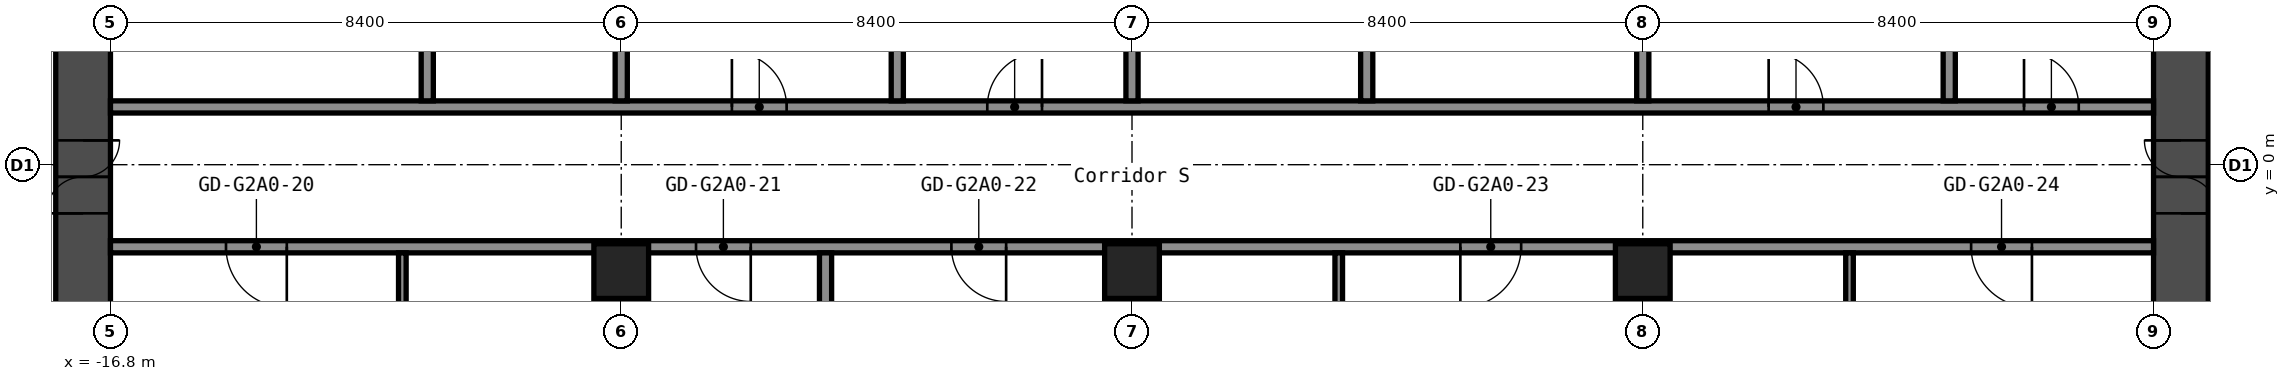
"""IFC4 building model, lengths in metres.
Left out: names, types, materials, properties, quantities, classifications, styles, units other than length and angle.
Written with IfcOpenShell. Run it as: python <this file> out.ifc"""

import sys

from ifc_helpers import new_model, si_unit, direction, frame, frame_2d, origin, origin_2d, place, context, subcontext, project, spatial, rectangle, hollow_rectangle, extrude, element, fill, save


model = new_model("IFC4")
c1 = context("Model", 3, precision=1e-05, world=origin(), true_north=direction((0.0, 1.0)))
c2 = subcontext(c1, "Body", "Model", "MODEL_VIEW")
j1 = project(units=[si_unit("LENGTHUNIT", "METRE"), si_unit("PLANEANGLEUNIT", "RADIAN")], contexts=[c1])
p1 = place(None, origin())
s1 = spatial("IfcSite", under=j1, at=p1, CompositionType="ELEMENT")
p2 = place(p1, origin())
s2 = spatial("IfcBuilding", under=s1, at=p2, CompositionType="ELEMENT")
p3 = place(p2, frame((0.0, 0.0, 75.4)))
s3 = spatial("IfcBuildingStorey", under=s2, at=p3, CompositionType="ELEMENT", Elevation=75.4)
for number, where, z_axis, x_axis in (
    (1, (-8.4, -1.75, 0.0), (0.0, 0.0, 1.0), (1.0, 0.0, 0.0)),
    (2, (0.0, -1.75, 0.0), (0.0, 0.0, 1.0), (1.0, 0.0, 0.0)),
    (3, (8.4, -1.75, 0.0), (0.0, 0.0, 1.0), (1.0, 0.0, 0.0)),
):
    element("IfcColumn", number, at=place(p3, frame(where, z_axis=z_axis, x_axis=x_axis)), inside=s3, PredefinedType="COLUMN", context=c2, shape_type="SweptSolid", body=[
        extrude(hollow_rectangle(XDim=0.9, YDim=0.9, WallThickness=0.036, at=origin_2d()), origin(), (0.0, 0.0, 1.0), 2.8),
    ])
p4 = place(p3, frame((-17.25, -8.4, 0.0), z_axis=(0.0, 0.0, 1.0), x_axis=(0.0, 1.0, 0.0)))
e4 = element("IfcWall", 4, at=p4, inside=s3, PredefinedType="SHEAR", context=c2, shape_type="SweptSolid", body=[
    extrude(rectangle(XDim=16.8, YDim=0.9, at=frame_2d((8.4, 0.0))), origin(), (0.0, 0.0, 1.0), 2.8),
])
p5 = place(p4, frame((7.6, 0.0, 0.0)))
e5 = element("IfcOpeningElement", 5, at=p5, cuts=e4, PredefinedType="OPENING", context=c2, shape_type="SweptSolid", body=[
    extrude(rectangle(XDim=1.2, YDim=2.1, at=frame_2d((0.6, 1.05))), frame((0.0, 0.46, 0.0), z_axis=(0.0, -1.0, 0.0), x_axis=(1.0, 0.0, 0.0)), (0.0, 0.0, 1.0), 0.92),
])
p6 = place(p3, frame((17.25, -8.4, 0.0), z_axis=(0.0, 0.0, 1.0), x_axis=(0.0, 1.0, 0.0)))
e6 = element("IfcWall", 6, at=p6, inside=s3, PredefinedType="SHEAR", context=c2, shape_type="SweptSolid", body=[
    extrude(rectangle(XDim=16.8, YDim=0.9, at=frame_2d((8.4, 0.0))), origin(), (0.0, 0.0, 1.0), 2.8),
])
p7 = place(p6, frame((7.6, 0.0, 0.0)))
e7 = element("IfcOpeningElement", 7, at=p7, cuts=e6, PredefinedType="OPENING", context=c2, shape_type="SweptSolid", body=[
    extrude(rectangle(XDim=1.2, YDim=2.1, at=frame_2d((0.6, 1.05))), frame((0.0, 0.46, 0.0), z_axis=(0.0, -1.0, 0.0), x_axis=(1.0, 0.0, 0.0)), (0.0, 0.0, 1.0), 0.92),
])
p8 = place(p3, frame((-16.8, -1.35, 0.0), z_axis=(0.0, 0.0, 1.0), x_axis=(1.0, 0.0, 0.0)))
e8 = element("IfcWall", 8, at=p8, inside=s3, PredefinedType="PARTITIONING", context=c2, shape_type="SweptSolid", body=[
    extrude(rectangle(XDim=33.6, YDim=0.2, at=frame_2d((16.8, 0.0))), origin(), (0.0, 0.0, 1.0), 2.8),
])
p9 = place(p8, frame((1.9, 0.0, 0.0)))
e9 = element("IfcOpeningElement", 9, at=p9, cuts=e8, PredefinedType="OPENING", context=c2, shape_type="SweptSolid", body=[
    extrude(rectangle(XDim=1.0, YDim=2.1, at=frame_2d((0.5, 1.05))), frame((0.0, 0.11, 0.0), z_axis=(0.0, -1.0, 0.0), x_axis=(1.0, 0.0, 0.0)), (0.0, 0.0, 1.0), 0.22),
])
p10 = place(p8, frame((9.63, 0.0, 0.0)))
e10 = element("IfcOpeningElement", 10, at=p10, cuts=e8, PredefinedType="OPENING", context=c2, shape_type="SweptSolid", body=[
    extrude(rectangle(XDim=0.9, YDim=2.1, at=frame_2d((0.45, 1.05))), frame((0.0, 0.11, 0.0), z_axis=(0.0, -1.0, 0.0), x_axis=(1.0, 0.0, 0.0)), (0.0, 0.0, 1.0), 0.22),
])
p11 = place(p8, frame((13.83, 0.0, 0.0)))
e11 = element("IfcOpeningElement", 11, at=p11, cuts=e8, PredefinedType="OPENING", context=c2, shape_type="SweptSolid", body=[
    extrude(rectangle(XDim=0.9, YDim=2.1, at=frame_2d((0.45, 1.05))), frame((0.0, 0.11, 0.0), z_axis=(0.0, -1.0, 0.0), x_axis=(1.0, 0.0, 0.0)), (0.0, 0.0, 1.0), 0.22),
])
p12 = place(p8, frame((22.2, 0.0, 0.0)))
e12 = element("IfcOpeningElement", 12, at=p12, cuts=e8, PredefinedType="OPENING", context=c2, shape_type="SweptSolid", body=[
    extrude(rectangle(XDim=1.0, YDim=2.1, at=frame_2d((0.5, 1.05))), frame((0.0, 0.11, 0.0), z_axis=(0.0, -1.0, 0.0), x_axis=(1.0, 0.0, 0.0)), (0.0, 0.0, 1.0), 0.22),
])
p13 = place(p8, frame((30.6, 0.0, 0.0)))
e13 = element("IfcOpeningElement", 13, at=p13, cuts=e8, PredefinedType="OPENING", context=c2, shape_type="SweptSolid", body=[
    extrude(rectangle(XDim=1.0, YDim=2.1, at=frame_2d((0.5, 1.05))), frame((0.0, 0.11, 0.0), z_axis=(0.0, -1.0, 0.0), x_axis=(1.0, 0.0, 0.0)), (0.0, 0.0, 1.0), 0.22),
])
p14 = place(p3, frame((-16.8, 0.95, 0.0), z_axis=(0.0, 0.0, 1.0), x_axis=(1.0, 0.0, 0.0)))
e14 = element("IfcWall", 14, at=p14, inside=s3, PredefinedType="PARTITIONING", context=c2, shape_type="SweptSolid", body=[
    extrude(rectangle(XDim=33.6, YDim=0.2, at=frame_2d((16.8, 0.0))), origin(), (0.0, 0.0, 1.0), 2.8),
])
p15 = place(p14, frame((10.22, 0.0, 0.0)))
e15 = element("IfcOpeningElement", 15, at=p15, cuts=e14, PredefinedType="OPENING", context=c2, shape_type="SweptSolid", body=[
    extrude(rectangle(XDim=0.9, YDim=2.1, at=frame_2d((0.45, 1.05))), frame((0.0, 0.11, 0.0), z_axis=(0.0, -1.0, 0.0), x_axis=(1.0, 0.0, 0.0)), (0.0, 0.0, 1.0), 0.22),
])
p16 = place(p14, frame((14.42, 0.0, 0.0)))
e16 = element("IfcOpeningElement", 16, at=p16, cuts=e14, PredefinedType="OPENING", context=c2, shape_type="SweptSolid", body=[
    extrude(rectangle(XDim=0.9, YDim=2.1, at=frame_2d((0.45, 1.05))), frame((0.0, 0.11, 0.0), z_axis=(0.0, -1.0, 0.0), x_axis=(1.0, 0.0, 0.0)), (0.0, 0.0, 1.0), 0.22),
])
p17 = place(p14, frame((27.27, 0.0, 0.0)))
e17 = element("IfcOpeningElement", 17, at=p17, cuts=e14, PredefinedType="OPENING", context=c2, shape_type="SweptSolid", body=[
    extrude(rectangle(XDim=0.9, YDim=2.1, at=frame_2d((0.45, 1.05))), frame((0.0, 0.11, 0.0), z_axis=(0.0, -1.0, 0.0), x_axis=(1.0, 0.0, 0.0)), (0.0, 0.0, 1.0), 0.22),
])
p18 = place(p14, frame((31.47, 0.0, 0.0)))
e18 = element("IfcOpeningElement", 18, at=p18, cuts=e14, PredefinedType="OPENING", context=c2, shape_type="SweptSolid", body=[
    extrude(rectangle(XDim=0.9, YDim=2.1, at=frame_2d((0.45, 1.05))), frame((0.0, 0.11, 0.0), z_axis=(0.0, -1.0, 0.0), x_axis=(1.0, 0.0, 0.0)), (0.0, 0.0, 1.0), 0.22),
])
p19 = place(p3, frame((-12.0, -4.75, 0.0), z_axis=(0.0, 0.0, 1.0), x_axis=(0.0, 1.0, 0.0)))
e19 = element("IfcWall", 19, at=p19, inside=s3, PredefinedType="PARTITIONING", context=c2, shape_type="SweptSolid", body=[
    extrude(rectangle(XDim=3.3, YDim=0.125, at=frame_2d((1.65, 0.0))), origin(), (0.0, 0.0, 1.0), 2.8),
])
p20 = place(p19, frame((1.2, 0.0, 0.0)))
e20 = element("IfcOpeningElement", 20, at=p20, cuts=e19, PredefinedType="OPENING", context=c2, shape_type="SweptSolid", body=[
    extrude(rectangle(XDim=1.0, YDim=2.1, at=frame_2d((0.5, 1.05))), frame((0.0, 0.073, 0.0), z_axis=(0.0, -1.0, 0.0), x_axis=(1.0, 0.0, 0.0)), (0.0, 0.0, 1.0), 0.145),
])
p21 = place(p3, frame((-11.59, 1.05, 0.0), z_axis=(0.0, 0.0, 1.0), x_axis=(0.0, 1.0, 0.0)))
e21 = element("IfcWall", 21, at=p21, inside=s3, PredefinedType="PARTITIONING", context=c2, shape_type="SweptSolid", body=[
    extrude(rectangle(XDim=5.9, YDim=0.2, at=frame_2d((2.95, 0.0))), origin(), (0.0, 0.0, 1.0), 2.8),
])
p22 = place(p3, frame((-8.4, -15.55, 0.0), z_axis=(0.0, 0.0, 1.0), x_axis=(0.0, 1.0, 0.0)))
e22 = element("IfcWall", 22, at=p22, inside=s3, PredefinedType="PARTITIONING", context=c2, shape_type="SweptSolid", body=[
    extrude(rectangle(XDim=13.36, YDim=0.2, at=frame_2d((6.68, 0.0))), origin(), (0.0, 0.0, 1.0), 2.8),
])
p23 = place(p3, frame((-8.4, 1.05, 0.0), z_axis=(0.0, 0.0, 1.0), x_axis=(0.0, 1.0, 0.0)))
e23 = element("IfcWall", 23, at=p23, inside=s3, PredefinedType="PARTITIONING", context=c2, shape_type="SweptSolid", body=[
    extrude(rectangle(XDim=5.9, YDim=0.2, at=frame_2d((2.95, 0.0))), origin(), (0.0, 0.0, 1.0), 2.8),
])
p24 = place(p3, frame((-5.04, -15.55, 0.0), z_axis=(0.0, 0.0, 1.0), x_axis=(0.0, 1.0, 0.0)))
e24 = element("IfcWall", 24, at=p24, inside=s3, PredefinedType="PARTITIONING", context=c2, shape_type="SweptSolid", body=[
    extrude(rectangle(XDim=14.1, YDim=0.2, at=frame_2d((7.05, 0.0))), origin(), (0.0, 0.0, 1.0), 2.8),
])
p25 = place(p3, frame((-3.86, 1.05, 0.0), z_axis=(0.0, 0.0, 1.0), x_axis=(0.0, 1.0, 0.0)))
e25 = element("IfcWall", 25, at=p25, inside=s3, PredefinedType="PARTITIONING", context=c2, shape_type="SweptSolid", body=[
    extrude(rectangle(XDim=5.9, YDim=0.2, at=frame_2d((2.95, 0.0))), origin(), (0.0, 0.0, 1.0), 2.8),
])
p26 = place(p3, frame((0.0, -15.55, 0.0), z_axis=(0.0, 0.0, 1.0), x_axis=(0.0, 1.0, 0.0)))
e26 = element("IfcWall", 26, at=p26, inside=s3, PredefinedType="PARTITIONING", context=c2, shape_type="SweptSolid", body=[
    extrude(rectangle(XDim=13.36, YDim=0.2, at=frame_2d((6.68, 0.0))), origin(), (0.0, 0.0, 1.0), 2.8),
])
p27 = place(p3, frame((0.0, 1.05, 0.0), z_axis=(0.0, 0.0, 1.0), x_axis=(0.0, 1.0, 0.0)))
e27 = element("IfcWall", 27, at=p27, inside=s3, PredefinedType="PARTITIONING", context=c2, shape_type="SweptSolid", body=[
    extrude(rectangle(XDim=5.9, YDim=0.2, at=frame_2d((2.95, 0.0))), origin(), (0.0, 0.0, 1.0), 2.8),
])
p28 = place(p3, frame((3.4, -4.75, 0.0), z_axis=(0.0, 0.0, 1.0), x_axis=(0.0, 1.0, 0.0)))
e28 = element("IfcWall", 28, at=p28, inside=s3, PredefinedType="PARTITIONING", context=c2, shape_type="SweptSolid", body=[
    extrude(rectangle(XDim=3.3, YDim=0.125, at=frame_2d((1.65, 0.0))), origin(), (0.0, 0.0, 1.0), 2.8),
])
p29 = place(p3, frame((3.86, 1.05, 0.0), z_axis=(0.0, 0.0, 1.0), x_axis=(0.0, 1.0, 0.0)))
e29 = element("IfcWall", 29, at=p29, inside=s3, PredefinedType="PARTITIONING", context=c2, shape_type="SweptSolid", body=[
    extrude(rectangle(XDim=5.9, YDim=0.2, at=frame_2d((2.95, 0.0))), origin(), (0.0, 0.0, 1.0), 2.8),
])
p30 = place(p3, frame((8.4, -15.55, 0.0), z_axis=(0.0, 0.0, 1.0), x_axis=(0.0, 1.0, 0.0)))
e30 = element("IfcWall", 30, at=p30, inside=s3, PredefinedType="PARTITIONING", context=c2, shape_type="SweptSolid", body=[
    extrude(rectangle(XDim=13.36, YDim=0.2, at=frame_2d((6.68, 0.0))), origin(), (0.0, 0.0, 1.0), 2.8),
])
p31 = place(p3, frame((8.4, 1.05, 0.0), z_axis=(0.0, 0.0, 1.0), x_axis=(0.0, 1.0, 0.0)))
e31 = element("IfcWall", 31, at=p31, inside=s3, PredefinedType="PARTITIONING", context=c2, shape_type="SweptSolid", body=[
    extrude(rectangle(XDim=5.9, YDim=0.2, at=frame_2d((2.95, 0.0))), origin(), (0.0, 0.0, 1.0), 2.8),
])
p32 = place(p3, frame((11.8, -4.75, 0.0), z_axis=(0.0, 0.0, 1.0), x_axis=(0.0, 1.0, 0.0)))
e32 = element("IfcWall", 32, at=p32, inside=s3, PredefinedType="PARTITIONING", context=c2, shape_type="SweptSolid", body=[
    extrude(rectangle(XDim=3.3, YDim=0.125, at=frame_2d((1.65, 0.0))), origin(), (0.0, 0.0, 1.0), 2.8),
])
p33 = place(p3, frame((13.44, 1.05, 0.0), z_axis=(0.0, 0.0, 1.0), x_axis=(0.0, 1.0, 0.0)))
e33 = element("IfcWall", 33, at=p33, inside=s3, PredefinedType="PARTITIONING", context=c2, shape_type="SweptSolid", body=[
    extrude(rectangle(XDim=5.9, YDim=0.2, at=frame_2d((2.95, 0.0))), origin(), (0.0, 0.0, 1.0), 2.8),
])
p34 = place(p5, origin())
e34 = element("IfcDoor", 34, at=p34, inside=s3, OperationType="DOUBLE_DOOR_SINGLE_SWING", PredefinedType="DOOR", context=c2, shape_type="SweptSolid", body=[
    extrude(rectangle(XDim=1.2, YDim=2.1, at=frame_2d((0.6, 1.05))), frame((0.0, 0.025, 0.0), z_axis=(0.0, -1.0, 0.0), x_axis=(1.0, 0.0, 0.0)), (0.0, 0.0, 1.0), 0.05),
])
fill(e5, e34)
p35 = place(p7, origin())
e35 = element("IfcDoor", 35, at=p35, inside=s3, OperationType="DOUBLE_DOOR_SINGLE_SWING", PredefinedType="DOOR", context=c2, shape_type="SweptSolid", body=[
    extrude(rectangle(XDim=1.2, YDim=2.1, at=frame_2d((0.6, 1.05))), frame((0.0, 0.025, 0.0), z_axis=(0.0, -1.0, 0.0), x_axis=(1.0, 0.0, 0.0)), (0.0, 0.0, 1.0), 0.05),
])
fill(e7, e35)
p36 = place(p9, origin())
e36 = element("IfcDoor", 36, at=p36, inside=s3, OperationType="SINGLE_SWING_RIGHT", PredefinedType="DOOR", context=c2, shape_type="SweptSolid", body=[
    extrude(rectangle(XDim=1.0, YDim=2.1, at=frame_2d((0.5, 1.05))), frame((0.0, 0.025, 0.0), z_axis=(0.0, -1.0, 0.0), x_axis=(1.0, 0.0, 0.0)), (0.0, 0.0, 1.0), 0.05),
])
fill(e9, e36)
p37 = place(p10, origin())
e37 = element("IfcDoor", 37, at=p37, inside=s3, OperationType="SINGLE_SWING_RIGHT", PredefinedType="DOOR", context=c2, shape_type="SweptSolid", body=[
    extrude(rectangle(XDim=0.9, YDim=2.1, at=frame_2d((0.45, 1.05))), frame((0.0, 0.025, 0.0), z_axis=(0.0, -1.0, 0.0), x_axis=(1.0, 0.0, 0.0)), (0.0, 0.0, 1.0), 0.05),
])
fill(e10, e37)
p38 = place(p11, origin())
e38 = element("IfcDoor", 38, at=p38, inside=s3, OperationType="SINGLE_SWING_RIGHT", PredefinedType="DOOR", context=c2, shape_type="SweptSolid", body=[
    extrude(rectangle(XDim=0.9, YDim=2.1, at=frame_2d((0.45, 1.05))), frame((0.0, 0.025, 0.0), z_axis=(0.0, -1.0, 0.0), x_axis=(1.0, 0.0, 0.0)), (0.0, 0.0, 1.0), 0.05),
])
fill(e11, e38)
p39 = place(p12, origin())
e39 = element("IfcDoor", 39, at=p39, inside=s3, OperationType="SINGLE_SWING_LEFT", PredefinedType="DOOR", context=c2, shape_type="SweptSolid", body=[
    extrude(rectangle(XDim=1.0, YDim=2.1, at=frame_2d((0.5, 1.05))), frame((0.0, 0.025, 0.0), z_axis=(0.0, -1.0, 0.0), x_axis=(1.0, 0.0, 0.0)), (0.0, 0.0, 1.0), 0.05),
])
fill(e12, e39)
p40 = place(p13, origin())
e40 = element("IfcDoor", 40, at=p40, inside=s3, OperationType="SINGLE_SWING_RIGHT", PredefinedType="DOOR", context=c2, shape_type="SweptSolid", body=[
    extrude(rectangle(XDim=1.0, YDim=2.1, at=frame_2d((0.5, 1.05))), frame((0.0, 0.025, 0.0), z_axis=(0.0, -1.0, 0.0), x_axis=(1.0, 0.0, 0.0)), (0.0, 0.0, 1.0), 0.05),
])
fill(e13, e40)
p41 = place(p15, origin())
e41 = element("IfcDoor", 41, at=p41, inside=s3, OperationType="SINGLE_SWING_RIGHT", PredefinedType="DOOR", context=c2, shape_type="SweptSolid", body=[
    extrude(rectangle(XDim=0.9, YDim=2.1, at=frame_2d((0.45, 1.05))), frame((0.0, 0.025, 0.0), z_axis=(0.0, -1.0, 0.0), x_axis=(1.0, 0.0, 0.0)), (0.0, 0.0, 1.0), 0.05),
])
fill(e15, e41)
p42 = place(p16, origin())
e42 = element("IfcDoor", 42, at=p42, inside=s3, OperationType="SINGLE_SWING_LEFT", PredefinedType="DOOR", context=c2, shape_type="SweptSolid", body=[
    extrude(rectangle(XDim=0.9, YDim=2.1, at=frame_2d((0.45, 1.05))), frame((0.0, 0.025, 0.0), z_axis=(0.0, -1.0, 0.0), x_axis=(1.0, 0.0, 0.0)), (0.0, 0.0, 1.0), 0.05),
])
fill(e16, e42)
p43 = place(p17, origin())
e43 = element("IfcDoor", 43, at=p43, inside=s3, OperationType="SINGLE_SWING_RIGHT", PredefinedType="DOOR", context=c2, shape_type="SweptSolid", body=[
    extrude(rectangle(XDim=0.9, YDim=2.1, at=frame_2d((0.45, 1.05))), frame((0.0, 0.025, 0.0), z_axis=(0.0, -1.0, 0.0), x_axis=(1.0, 0.0, 0.0)), (0.0, 0.0, 1.0), 0.05),
])
fill(e17, e43)
p44 = place(p18, origin())
e44 = element("IfcDoor", 44, at=p44, inside=s3, OperationType="SINGLE_SWING_RIGHT", PredefinedType="DOOR", context=c2, shape_type="SweptSolid", body=[
    extrude(rectangle(XDim=0.9, YDim=2.1, at=frame_2d((0.45, 1.05))), frame((0.0, 0.025, 0.0), z_axis=(0.0, -1.0, 0.0), x_axis=(1.0, 0.0, 0.0)), (0.0, 0.0, 1.0), 0.05),
])
fill(e18, e44)
save(model, sys.argv[1])
